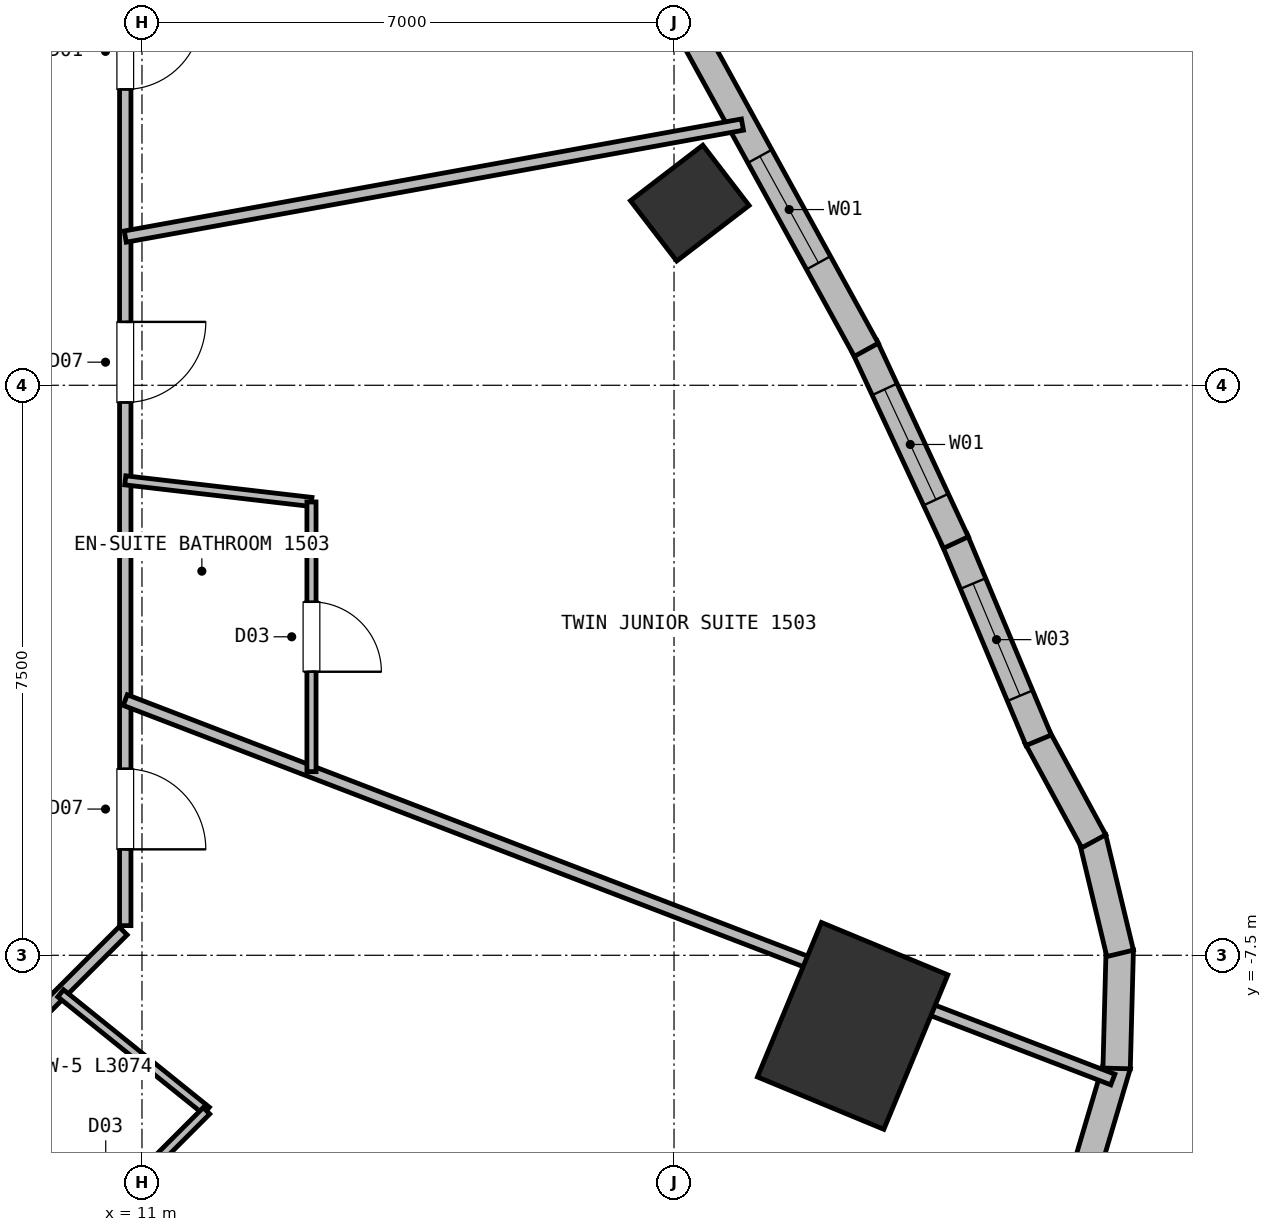
"""IFC4 building model, lengths in metres.
Left out: names, types, materials, properties, quantities, classifications, styles, units other than length and angle.
Written with IfcOpenShell. Run it as: python <this file> out.ifc"""

import sys

from ifc_helpers import new_model, si_unit, direction, frame, frame_2d, origin, origin_2d, place, context, subcontext, project, spatial, rectangle, extrude, element, fill, save


model = new_model("IFC4")
c1 = context("Model", 3, precision=1e-05, world=origin(), true_north=direction((0.0, 1.0)))
c2 = subcontext(c1, "Body", "Model", "MODEL_VIEW")
j1 = project(units=[si_unit("LENGTHUNIT", "METRE"), si_unit("PLANEANGLEUNIT", "RADIAN")], contexts=[c1])
p1 = place(None, origin())
s1 = spatial("IfcSite", under=j1, at=p1, CompositionType="ELEMENT")
p2 = place(p1, origin())
s2 = spatial("IfcBuilding", under=s1, at=p2, CompositionType="ELEMENT")
p3 = place(p2, frame((0.0, 0.0, 53.0)))
s3 = spatial("IfcBuildingStorey", under=s2, at=p3, CompositionType="ELEMENT", Elevation=53.0)
p4 = place(p3, frame((20.35, -8.429, 0.0), z_axis=(0.0, 0.0, 1.0), x_axis=(-0.923879532511, 0.382683432365, 0.0)))
e1 = element("IfcColumn", 1, at=p4, inside=s3, PredefinedType="COLUMN", context=c2, shape_type="SweptSolid", body=[
    extrude(rectangle(XDim=1.8, YDim=2.2, at=origin_2d()), origin(), (0.0, 0.0, 1.0), 3.75),
])
p5 = place(p3, frame((18.207, 2.397, 0.0), z_axis=(0.0, 0.0, 1.0), x_axis=(-0.608761429009, 0.793353340291, 0.0)))
e2 = element("IfcColumn", 2, at=p5, inside=s3, PredefinedType="COLUMN", context=c2, shape_type="SweptSolid", body=[
    extrude(rectangle(XDim=1.0, YDim=1.2, at=origin_2d()), origin(), (0.0, 0.0, 1.0), 3.75),
])
for number, where, z_axis, x_axis in (
    (3, (23.831, -8.94, 0.0), (0.0, 0.0, 1.0), (-0.284, -0.959, 0.0)),
    (4, (23.864, -7.425, 0.0), (0.0, 0.0, 1.0), (-0.026, -1.0, 0.0)),
    (5, (23.504, -5.954, 0.0), (0.0, 0.0, 1.0), (0.233, -0.972, 0.0)),
):
    element("IfcWall", number, at=place(p3, frame(where, z_axis=z_axis, x_axis=x_axis)), inside=s3, PredefinedType="SOLIDWALL", context=c2, shape_type="SweptSolid", body=[
        extrude(rectangle(XDim=1.564, YDim=0.36, at=frame_2d((0.782, 0.0))), origin(), (0.0, 0.0, 1.0), 3.5),
    ])
p6 = place(p3, frame((22.776, -4.625, 0.0), z_axis=(0.0, 0.0, 1.0), x_axis=(0.477057413098, -0.878872132115, 0.0)))
e6 = element("IfcWall", 6, at=p6, inside=s3, PredefinedType="SOLIDWALL", context=c2, shape_type="SweptSolid", body=[
    extrude(rectangle(XDim=1.564, YDim=0.36, at=frame_2d((0.782, 0.0))), origin(), (0.0, 0.0, 1.0), 3.5),
])
p7 = place(p3, frame((21.689, -2.023, 0.0), z_axis=(0.0, 0.0, 1.0), x_axis=(0.386287899082, -0.922378262441, 0.0)))
e7 = element("IfcWall", 7, at=p7, inside=s3, PredefinedType="SOLIDWALL", context=c2, shape_type="SweptSolid", body=[
    extrude(rectangle(XDim=2.87, YDim=0.36, at=frame_2d((1.435, 0.0))), origin(), (0.0, 0.0, 1.0), 3.5),
])
p8 = place(p7, frame((0.635, 0.0, 0.72)))
e8 = element("IfcOpeningElement", 8, at=p8, cuts=e7, PredefinedType="OPENING", context=c2, shape_type="SweptSolid", body=[
    extrude(rectangle(XDim=1.6, YDim=1.88, at=frame_2d((0.8, 0.94))), frame((0.0, 0.19, 0.0), z_axis=(0.0, -1.0, 0.0), x_axis=(1.0, 0.0, 0.0)), (0.0, 0.0, 1.0), 0.38),
])
p9 = place(p3, frame((20.507, 0.511, 0.0), z_axis=(0.0, 0.0, 1.0), x_axis=(0.422134095938, -0.906533399851, 0.0)))
e9 = element("IfcWall", 9, at=p9, inside=s3, PredefinedType="SOLIDWALL", context=c2, shape_type="SweptSolid", body=[
    extrude(rectangle(XDim=2.847, YDim=0.36, at=frame_2d((1.423, 0.0))), origin(), (0.0, 0.0, 1.0), 3.5),
])
p10 = place(p9, frame((0.623, 0.0, 0.72)))
e10 = element("IfcOpeningElement", 10, at=p10, cuts=e9, PredefinedType="OPENING", context=c2, shape_type="SweptSolid", body=[
    extrude(rectangle(XDim=1.6, YDim=1.88, at=frame_2d((0.8, 0.94))), frame((0.0, 0.19, 0.0), z_axis=(0.0, -1.0, 0.0), x_axis=(1.0, 0.0, 0.0)), (0.0, 0.0, 1.0), 0.38),
])
p11 = place(p3, frame((17.365, 6.22, 0.0), z_axis=(0.0, 0.0, 1.0), x_axis=(0.481970134715, -0.876187644995, 0.0)))
e11 = element("IfcWall", 11, at=p11, inside=s3, PredefinedType="SOLIDWALL", context=c2, shape_type="SweptSolid", body=[
    extrude(rectangle(XDim=6.566, YDim=0.36, at=frame_2d((3.283, 0.0))), origin(), (0.0, 0.0, 1.0), 3.5),
])
p12 = place(p11, frame((3.66, 0.0, 0.72)))
e12 = element("IfcOpeningElement", 12, at=p12, cuts=e11, PredefinedType="OPENING", context=c2, shape_type="SweptSolid", body=[
    extrude(rectangle(XDim=1.6, YDim=1.88, at=frame_2d((0.8, 0.94))), frame((0.0, 0.19, 0.0), z_axis=(0.0, -1.0, 0.0), x_axis=(1.0, 0.0, 0.0)), (0.0, 0.0, 1.0), 0.38),
])
p13 = place(p3, frame((10.752, -7.178, 0.0), z_axis=(0.0, 0.0, 1.0), x_axis=(-0.707067066127, -0.707146494016, 0.0)))
e13 = element("IfcWall", 13, at=p13, inside=s3, PredefinedType="PARTITIONING", context=c2, shape_type="SweptSolid", body=[
    extrude(rectangle(XDim=3.074, YDim=0.15, at=frame_2d((1.537, 0.0))), origin(), (0.0, 0.0, 1.0), 3.12),
])
p14 = place(p3, frame((10.78, 7.11, 0.0), z_axis=(0.0, 0.0, 1.0), x_axis=(0.0, -1.0, 0.0)))
e14 = element("IfcWall", 14, at=p14, inside=s3, PredefinedType="PARTITIONING", context=c2, shape_type="SweptSolid", body=[
    extrude(rectangle(XDim=14.22, YDim=0.15, at=frame_2d((7.11, 0.0))), origin(), (0.0, 0.0, 1.0), 3.12),
])
p15 = place(p14, frame((2.217, 0.0, 0.0)))
e15 = element("IfcOpeningElement", 15, at=p15, cuts=e14, PredefinedType="OPENING", context=c2, shape_type="SweptSolid", body=[
    extrude(rectangle(XDim=1.0, YDim=2.15, at=frame_2d((0.5, 1.075))), frame((0.0, 0.085, 0.0), z_axis=(0.0, -1.0, 0.0), x_axis=(1.0, 0.0, 0.0)), (0.0, 0.0, 1.0), 0.17),
])
p16 = place(p14, frame((6.276, 0.0, 0.0)))
e16 = element("IfcOpeningElement", 16, at=p16, cuts=e14, PredefinedType="OPENING", context=c2, shape_type="SweptSolid", body=[
    extrude(rectangle(XDim=1.06, YDim=2.15, at=frame_2d((0.53, 1.075))), frame((0.0, 0.085, 0.0), z_axis=(0.0, -1.0, 0.0), x_axis=(1.0, 0.0, 0.0)), (0.0, 0.0, 1.0), 0.17),
])
p17 = place(p14, frame((12.156, 0.0, 0.0)))
e17 = element("IfcOpeningElement", 17, at=p17, cuts=e14, PredefinedType="OPENING", context=c2, shape_type="SweptSolid", body=[
    extrude(rectangle(XDim=1.06, YDim=2.15, at=frame_2d((0.53, 1.075))), frame((0.0, 0.085, 0.0), z_axis=(0.0, -1.0, 0.0), x_axis=(1.0, 0.0, 0.0)), (0.0, 0.0, 1.0), 0.17),
])
p18 = place(p3, frame((6.802, -9.38, 0.0), z_axis=(0.0, 0.0, 1.0), x_axis=(0.587056194983, -0.80954618394, 0.0)))
e18 = element("IfcWall", 18, at=p18, inside=s3, PredefinedType="PARTITIONING", context=c2, shape_type="SweptSolid", body=[
    extrude(rectangle(XDim=8.216, YDim=0.15, at=frame_2d((4.108, 0.0))), origin(), (0.0, 0.0, 1.0), 3.5),
])
p19 = place(p3, frame((9.93, -8.0, 0.0), z_axis=(0.0, 0.0, 1.0), x_axis=(0.778737774775, -0.627349566142, 0.0)))
e19 = element("IfcWall", 19, at=p19, inside=s3, PredefinedType="PARTITIONING", context=c2, shape_type="SweptSolid", body=[
    extrude(rectangle(XDim=2.464, YDim=0.12, at=frame_2d((1.232, 0.0))), origin(), (0.0, 0.0, 1.0), 3.5),
])
p20 = place(p3, frame((11.849, -9.546, 0.0), z_axis=(0.0, 0.0, 1.0), x_axis=(-0.707144567105, -0.707068993249, 0.0)))
e20 = element("IfcWall", 20, at=p20, inside=s3, PredefinedType="PARTITIONING", context=c2, shape_type="SweptSolid", body=[
    extrude(rectangle(XDim=3.23, YDim=0.12, at=frame_2d((1.615, 0.0))), origin(), (0.0, 0.0, 1.0), 3.5),
])
p21 = place(p20, frame((1.155, 0.0, 0.0)))
e21 = element("IfcOpeningElement", 21, at=p21, cuts=e20, PredefinedType="OPENING", context=c2, shape_type="SweptSolid", body=[
    extrude(rectangle(XDim=0.92, YDim=2.1, at=frame_2d((0.46, 1.05))), frame((0.0, 0.07, 0.0), z_axis=(0.0, -1.0, 0.0), x_axis=(1.0, 0.0, 0.0)), (0.0, 0.0, 1.0), 0.14),
])
p22 = place(p3, frame((10.78, -4.142, 0.0), z_axis=(0.0, 0.0, 1.0), x_axis=(0.933466701783, -0.358664072166, 0.0)))
e22 = element("IfcWall", 22, at=p22, inside=s3, PredefinedType="PARTITIONING", context=c2, shape_type="SweptSolid", body=[
    extrude(rectangle(XDim=13.919, YDim=0.15, at=frame_2d((6.96, 0.0))), origin(), (0.0, 0.0, 1.0), 3.5),
])
p23 = place(p3, frame((13.23, -1.535, 0.0), z_axis=(0.0, 0.0, 1.0), x_axis=(-0.993328492048, 0.115319152291, 0.0)))
e23 = element("IfcWall", 23, at=p23, inside=s3, PredefinedType="PARTITIONING", context=c2, shape_type="SweptSolid", body=[
    extrude(rectangle(XDim=2.466, YDim=0.12, at=frame_2d((1.233, 0.0))), origin(), (0.0, 0.0, 1.0), 3.5),
])
p24 = place(p3, frame((13.23, -1.535, 0.0), z_axis=(0.0, 0.0, 1.0), x_axis=(0.0, -1.0, 0.0)))
e24 = element("IfcWall", 24, at=p24, inside=s3, PredefinedType="PARTITIONING", context=c2, shape_type="SweptSolid", body=[
    extrude(rectangle(XDim=3.548, YDim=0.12, at=frame_2d((1.774, 0.0))), origin(), (0.0, 0.0, 1.0), 3.5),
])
p25 = place(p24, frame((1.314, 0.0, 0.0)))
e25 = element("IfcOpeningElement", 25, at=p25, cuts=e24, PredefinedType="OPENING", context=c2, shape_type="SweptSolid", body=[
    extrude(rectangle(XDim=0.92, YDim=2.1, at=frame_2d((0.46, 1.05))), frame((0.0, 0.07, 0.0), z_axis=(0.0, -1.0, 0.0), x_axis=(1.0, 0.0, 0.0)), (0.0, 0.0, 1.0), 0.14),
])
p26 = place(p3, frame((10.78, 1.956, 0.0), z_axis=(0.0, 0.0, 1.0), x_axis=(0.983928549694, 0.178562619542, 0.0)))
e26 = element("IfcWall", 26, at=p26, inside=s3, PredefinedType="PARTITIONING", context=c2, shape_type="SweptSolid", body=[
    extrude(rectangle(XDim=8.253, YDim=0.15, at=frame_2d((4.126, 0.0))), origin(), (0.0, 0.0, 1.0), 3.5),
])
p27 = place(p8, origin())
e27 = element("IfcWindow", 27, at=p27, inside=s3, PartitioningType="SINGLE_PANEL", PredefinedType="WINDOW", context=c2, shape_type="SweptSolid", body=[
    extrude(rectangle(XDim=1.6, YDim=1.88, at=frame_2d((0.8, 0.94))), frame((0.0, 0.03, 0.0), z_axis=(0.0, -1.0, 0.0), x_axis=(1.0, 0.0, 0.0)), (0.0, 0.0, 1.0), 0.06),
])
fill(e8, e27)
p28 = place(p10, origin())
e28 = element("IfcWindow", 28, at=p28, inside=s3, PartitioningType="SINGLE_PANEL", PredefinedType="WINDOW", context=c2, shape_type="SweptSolid", body=[
    extrude(rectangle(XDim=1.6, YDim=1.88, at=frame_2d((0.8, 0.94))), frame((0.0, 0.03, 0.0), z_axis=(0.0, -1.0, 0.0), x_axis=(1.0, 0.0, 0.0)), (0.0, 0.0, 1.0), 0.06),
])
fill(e10, e28)
p29 = place(p12, origin())
e29 = element("IfcWindow", 29, at=p29, inside=s3, PartitioningType="SINGLE_PANEL", PredefinedType="WINDOW", context=c2, shape_type="SweptSolid", body=[
    extrude(rectangle(XDim=1.6, YDim=1.88, at=frame_2d((0.8, 0.94))), frame((0.0, 0.03, 0.0), z_axis=(0.0, -1.0, 0.0), x_axis=(1.0, 0.0, 0.0)), (0.0, 0.0, 1.0), 0.06),
])
fill(e12, e29)
p30 = place(p25, origin())
e30 = element("IfcDoor", 30, at=p30, inside=s3, OperationType="SINGLE_SWING_RIGHT", PredefinedType="DOOR", context=c2, shape_type="SweptSolid", body=[
    extrude(rectangle(XDim=0.92, YDim=2.1, at=frame_2d((0.46, 1.05))), frame((0.0, 0.025, 0.0), z_axis=(0.0, -1.0, 0.0), x_axis=(1.0, 0.0, 0.0)), (0.0, 0.0, 1.0), 0.05),
])
fill(e25, e30)
p31 = place(p15, origin())
e31 = element("IfcDoor", 31, at=p31, inside=s3, OperationType="SINGLE_SWING_LEFT", PredefinedType="DOOR", context=c2, shape_type="SweptSolid", body=[
    extrude(rectangle(XDim=1.0, YDim=2.15, at=frame_2d((0.5, 1.075))), frame((0.0, 0.025, 0.0), z_axis=(0.0, -1.0, 0.0), x_axis=(1.0, 0.0, 0.0)), (0.0, 0.0, 1.0), 0.05),
])
fill(e15, e31)
p32 = place(p16, origin())
e32 = element("IfcDoor", 32, at=p32, inside=s3, OperationType="SINGLE_SWING_LEFT", PredefinedType="DOOR", context=c2, shape_type="SweptSolid", body=[
    extrude(rectangle(XDim=1.06, YDim=2.15, at=frame_2d((0.53, 1.075))), frame((0.0, 0.025, 0.0), z_axis=(0.0, -1.0, 0.0), x_axis=(1.0, 0.0, 0.0)), (0.0, 0.0, 1.0), 0.05),
])
fill(e16, e32)
p33 = place(p17, origin())
e33 = element("IfcDoor", 33, at=p33, inside=s3, OperationType="SINGLE_SWING_RIGHT", PredefinedType="DOOR", context=c2, shape_type="SweptSolid", body=[
    extrude(rectangle(XDim=1.06, YDim=2.15, at=frame_2d((0.53, 1.075))), frame((0.0, 0.025, 0.0), z_axis=(0.0, -1.0, 0.0), x_axis=(1.0, 0.0, 0.0)), (0.0, 0.0, 1.0), 0.05),
])
fill(e17, e33)
save(model, sys.argv[1])
